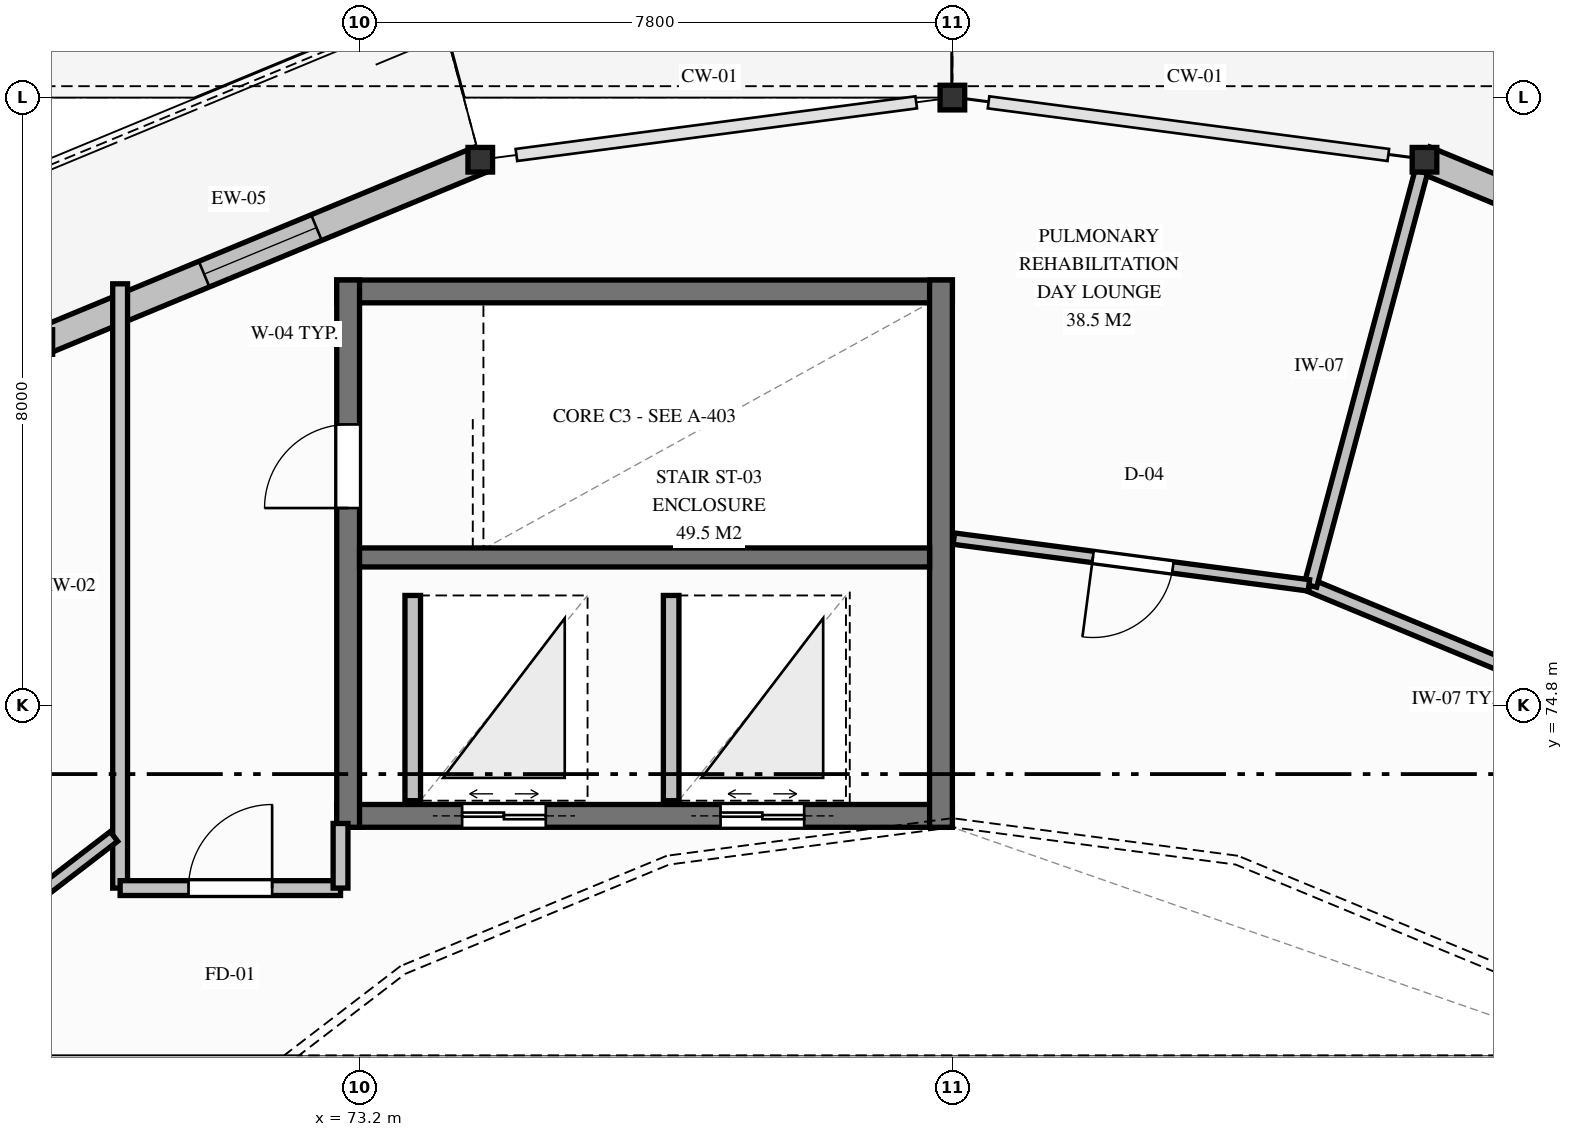
"""IFC4 building model, lengths in metres.
Left out: names, types, materials, properties, quantities, classifications, styles, units other than length and angle.
Written with IfcOpenShell. Run it as: python <this file> out.ifc"""

import sys

from ifc_helpers import new_model, si_unit, direction, frame, frame_2d, origin, origin_2d, place, context, subcontext, project, spatial, rectangle, hollow_circle, extrude, element, fill, save


model = new_model("IFC4")
c1 = context("Model", 3, precision=1e-05, world=origin(), true_north=direction((0.0, 1.0)))
c2 = subcontext(c1, "Body", "Model", "MODEL_VIEW")
j1 = project(units=[si_unit("LENGTHUNIT", "METRE"), si_unit("PLANEANGLEUNIT", "RADIAN")], contexts=[c1])
p1 = place(None, origin())
s1 = spatial("IfcSite", under=j1, at=p1, CompositionType="ELEMENT")
p2 = place(p1, origin())
s2 = spatial("IfcBuilding", under=s1, at=p2, CompositionType="ELEMENT")
p3 = place(p2, frame((0.0, 0.0, 17.25)))
s3 = spatial("IfcBuildingStorey", under=s2, at=p3, CompositionType="ELEMENT", Elevation=17.25)
p4 = place(p3, frame((72.9, 80.25, 0.0), z_axis=(0.0, 0.0, 1.0), x_axis=(1.0, 0.0, 0.0)))
e1 = element("IfcWall", 1, at=p4, inside=s3, PredefinedType="SHEAR", context=c2, shape_type="SweptSolid", body=[
    extrude(rectangle(XDim=8.1, YDim=0.3, at=frame_2d((4.05, 0.0))), origin(), (0.0, 0.0, 1.0), 4.05),
])
p5 = place(p3, frame((72.9, 73.35, 0.0), z_axis=(0.0, 0.0, 1.0), x_axis=(1.0, 0.0, 0.0)))
e2 = element("IfcWall", 2, at=p5, inside=s3, PredefinedType="SHEAR", context=c2, shape_type="SweptSolid", body=[
    extrude(rectangle(XDim=8.1, YDim=0.3, at=frame_2d((4.05, 0.0))), origin(), (0.0, 0.0, 1.0), 4.05),
])
p6 = place(p5, frame((1.65, 0.0, 0.0)))
e3 = element("IfcOpeningElement", 3, at=p6, cuts=e2, PredefinedType="OPENING", context=c2, shape_type="SweptSolid", body=[
    extrude(rectangle(XDim=1.1, YDim=2.1, at=frame_2d((0.55, 1.05))), frame((0.0, 0.16, 0.0), z_axis=(0.0, -1.0, 0.0), x_axis=(1.0, 0.0, 0.0)), (0.0, 0.0, 1.0), 0.32),
])
p7 = place(p5, frame((5.05, 0.0, 0.0)))
e4 = element("IfcOpeningElement", 4, at=p7, cuts=e2, PredefinedType="OPENING", context=c2, shape_type="SweptSolid", body=[
    extrude(rectangle(XDim=1.1, YDim=2.1, at=frame_2d((0.55, 1.05))), frame((0.0, 0.16, 0.0), z_axis=(0.0, -1.0, 0.0), x_axis=(1.0, 0.0, 0.0)), (0.0, 0.0, 1.0), 0.32),
])
p8 = place(p3, frame((73.05, 73.2, 0.0), z_axis=(0.0, 0.0, 1.0), x_axis=(0.0, 1.0, 0.0)))
e5 = element("IfcWall", 5, at=p8, inside=s3, PredefinedType="SHEAR", context=c2, shape_type="SweptSolid", body=[
    extrude(rectangle(XDim=7.2, YDim=0.3, at=frame_2d((3.6, 0.0))), origin(), (0.0, 0.0, 1.0), 4.05),
])
p9 = place(p8, frame((4.2, 0.0, 0.0)))
e6 = element("IfcOpeningElement", 6, at=p9, cuts=e5, PredefinedType="OPENING", context=c2, shape_type="SweptSolid", body=[
    extrude(rectangle(XDim=1.1, YDim=2.15, at=frame_2d((0.55, 1.075))), frame((0.0, 0.16, 0.0), z_axis=(0.0, -1.0, 0.0), x_axis=(1.0, 0.0, 0.0)), (0.0, 0.0, 1.0), 0.32),
])
p10 = place(p3, frame((80.85, 73.2, 0.0), z_axis=(0.0, 0.0, 1.0), x_axis=(0.0, 1.0, 0.0)))
e7 = element("IfcWall", 7, at=p10, inside=s3, PredefinedType="SHEAR", context=c2, shape_type="SweptSolid", body=[
    extrude(rectangle(XDim=7.2, YDim=0.3, at=frame_2d((3.6, 0.0))), origin(), (0.0, 0.0, 1.0), 4.05),
])
p11 = place(p3, frame((73.2, 76.75, 0.0), z_axis=(0.0, 0.0, 1.0), x_axis=(1.0, 0.0, 0.0)))
e8 = element("IfcWall", 8, at=p11, inside=s3, PredefinedType="SHEAR", context=c2, shape_type="SweptSolid", body=[
    extrude(rectangle(XDim=7.5, YDim=0.25, at=frame_2d((3.75, 0.0))), origin(), (0.0, 0.0, 1.0), 4.05),
])
for number, where, z_axis, x_axis in (
    (9, (87.212, 81.982, 0.0), (0.0, 0.0, 1.0), (1.0, 0.0, 0.0)),
    (10, (81.0, 82.8, 0.0), (0.0, 0.0, 1.0), (1.0, 0.0, 0.0)),
    (11, (74.788, 81.982, 0.0), (0.0, 0.0, 1.0), (1.0, 0.0, 0.0)),
    (12, (69.0, 79.585, 0.0), (0.0, 0.0, 1.0), (1.0, 0.0, 0.0)),
):
    element("IfcColumn", number, at=place(p3, frame(where, z_axis=z_axis, x_axis=x_axis)), inside=s3, PredefinedType="COLUMN", context=c2, shape_type="SweptSolid", body=[
        extrude(hollow_circle(Radius=0.162, WallThickness=0.016, at=origin_2d()), origin(), (0.0, 0.0, 1.0), 4.05),
    ])
p12 = place(p3, frame((87.212, 81.982, 0.0), z_axis=(0.0, 0.0, 1.0), x_axis=(0.9238876519, -0.382663829839, 0.0)))
e13 = element("IfcWall", 13, at=p12, inside=s3, PredefinedType="SOLIDWALL", context=c2, shape_type="SweptSolid", body=[
    extrude(rectangle(XDim=6.265, YDim=0.365, at=frame_2d((3.133, 0.0))), origin(), (0.0, 0.0, 1.0), 3.528),
])
p13 = place(p12, frame((2.258, 0.0, 0.85)))
e14 = element("IfcOpeningElement", 14, at=p13, cuts=e13, PredefinedType="OPENING", context=c2, shape_type="SweptSolid", body=[
    extrude(rectangle(XDim=1.75, YDim=1.85, at=frame_2d((0.875, 0.925))), frame((0.0, 0.192, 0.0), z_axis=(0.0, -1.0, 0.0), x_axis=(1.0, 0.0, 0.0)), (0.0, 0.0, 1.0), 0.385),
])
p14 = place(p3, frame((69.0, 79.585, 0.0), z_axis=(0.0, 0.0, 1.0), x_axis=(0.9238876519, 0.382663829839, 0.0)))
e15 = element("IfcWall", 15, at=p14, inside=s3, PredefinedType="SOLIDWALL", context=c2, shape_type="SweptSolid", body=[
    extrude(rectangle(XDim=6.265, YDim=0.365, at=frame_2d((3.133, 0.0))), origin(), (0.0, 0.0, 1.0), 3.528),
])
p15 = place(p14, frame((2.333, 0.0, 0.85)))
e16 = element("IfcOpeningElement", 16, at=p15, cuts=e15, PredefinedType="OPENING", context=c2, shape_type="SweptSolid", body=[
    extrude(rectangle(XDim=1.6, YDim=1.9, at=frame_2d((0.8, 0.95))), frame((0.0, 0.192, 0.0), z_axis=(0.0, -1.0, 0.0), x_axis=(1.0, 0.0, 0.0)), (0.0, 0.0, 1.0), 0.385),
])
for number, where, z_axis, x_axis in (
    (17, (73.9, 73.55, 0.0), (0.0, 0.0, 1.0), (0.0, 1.0, 0.0)),
    (18, (77.3, 73.55, 0.0), (0.0, 0.0, 1.0), (0.0, 1.0, 0.0)),
):
    element("IfcWall", number, at=place(p3, frame(where, z_axis=z_axis, x_axis=x_axis)), inside=s3, PredefinedType="PARTITIONING", context=c2, shape_type="SweptSolid", body=[
        extrude(rectangle(XDim=2.7, YDim=0.205, at=frame_2d((1.35, 0.0))), origin(), (0.0, 0.0, 1.0), 3.78),
    ])
p16 = place(p3, frame((70.05, 72.4, 0.0), z_axis=(0.0, 0.0, 1.0), x_axis=(0.0, 1.0, 0.0)))
e19 = element("IfcWall", 19, at=p16, inside=s3, PredefinedType="PARTITIONING", context=c2, shape_type="SweptSolid", body=[
    extrude(rectangle(XDim=7.95, YDim=0.195, at=frame_2d((3.975, 0.0))), origin(), (0.0, 0.0, 1.0), 3.528),
])
p17 = place(p3, frame((70.05, 72.4, 0.0), z_axis=(0.0, 0.0, 1.0), x_axis=(1.0, 0.0, 0.0)))
e20 = element("IfcWall", 20, at=p17, inside=s3, PredefinedType="PARTITIONING", context=c2, shape_type="SweptSolid", body=[
    extrude(rectangle(XDim=2.9, YDim=0.195, at=frame_2d((1.45, 0.0))), origin(), (0.0, 0.0, 1.0), 3.78),
])
p18 = place(p17, frame((0.9, 0.0, 0.0)))
e21 = element("IfcOpeningElement", 21, at=p18, cuts=e20, PredefinedType="OPENING", context=c2, shape_type="SweptSolid", body=[
    extrude(rectangle(XDim=1.1, YDim=2.15, at=frame_2d((0.55, 1.075))), frame((0.0, 0.107, 0.0), z_axis=(0.0, -1.0, 0.0), x_axis=(1.0, 0.0, 0.0)), (0.0, 0.0, 1.0), 0.215),
])
p19 = place(p3, frame((72.95, 72.4, 0.0), z_axis=(0.0, 0.0, 1.0), x_axis=(0.0, 1.0, 0.0)))
e22 = element("IfcWall", 22, at=p19, inside=s3, PredefinedType="PARTITIONING", context=c2, shape_type="SweptSolid", body=[
    extrude(rectangle(XDim=0.85, YDim=0.195, at=frame_2d((0.425, 0.0))), origin(), (0.0, 0.0, 1.0), 3.78),
])
p20 = place(p3, frame((90.1, 74.562, 0.0), z_axis=(0.0, 0.0, 1.0), x_axis=(-0.923889703059, 0.382658877568, 0.0)))
e23 = element("IfcWall", 23, at=p20, inside=s3, PredefinedType="PARTITIONING", context=c2, shape_type="SweptSolid", body=[
    extrude(rectangle(XDim=4.751, YDim=0.17, at=frame_2d((2.375, 0.0))), origin(), (0.0, 0.0, 1.0), 3.78),
])
p21 = place(p3, frame((85.71, 76.38, 0.0), z_axis=(0.0, 0.0, 1.0), x_axis=(0.258829913508, 0.965922914043, 0.0)))
e24 = element("IfcWall", 24, at=p21, inside=s3, PredefinedType="PARTITIONING", context=c2, shape_type="SweptSolid", body=[
    extrude(rectangle(XDim=5.636, YDim=0.17, at=frame_2d((2.818, 0.0))), origin(), (0.0, 0.0, 1.0), 3.528),
])
p22 = place(p3, frame((69.969, 73.079, 0.0), z_axis=(0.0, 0.0, 1.0), x_axis=(-0.7933756116, -0.608732403374, 0.0)))
e25 = element("IfcWall", 25, at=p22, inside=s3, PredefinedType="PARTITIONING", context=c2, shape_type="SweptSolid", body=[
    extrude(rectangle(XDim=2.317, YDim=0.16, at=frame_2d((1.158, 0.0))), origin(), (0.0, 0.0, 1.0), 3.78),
])
p23 = place(p3, frame((85.69, 76.383, 0.0), z_axis=(0.0, 0.0, 1.0), x_axis=(-0.991448296829, 0.13050009469, 0.0)))
e26 = element("IfcWall", 26, at=p23, inside=s3, PredefinedType="PARTITIONING", context=c2, shape_type="SweptSolid", body=[
    extrude(rectangle(XDim=4.711, YDim=0.15, at=frame_2d((2.355, 0.0))), origin(), (0.0, 0.0, 1.0), 3.78),
])
p24 = place(p23, frame((1.805, 0.0, 0.0)))
e27 = element("IfcOpeningElement", 27, at=p24, cuts=e26, PredefinedType="OPENING", context=c2, shape_type="SweptSolid", body=[
    extrude(rectangle(XDim=1.06, YDim=2.16, at=frame_2d((0.53, 1.08))), frame((0.0, 0.085, 0.0), z_axis=(0.0, -1.0, 0.0), x_axis=(1.0, 0.0, 0.0)), (0.0, 0.0, 1.0), 0.17),
])
p25 = place(p15, origin())
e28 = element("IfcWindow", 28, at=p25, inside=s3, PartitioningType="SINGLE_PANEL", PredefinedType="WINDOW", context=c2, shape_type="SweptSolid", body=[
    extrude(rectangle(XDim=1.6, YDim=1.9, at=frame_2d((0.8, 0.95))), frame((0.0, 0.03, 0.0), z_axis=(0.0, -1.0, 0.0), x_axis=(1.0, 0.0, 0.0)), (0.0, 0.0, 1.0), 0.06),
])
fill(e16, e28)
p26 = place(p9, origin())
e29 = element("IfcDoor", 29, at=p26, inside=s3, OperationType="SINGLE_SWING_LEFT", PredefinedType="DOOR", context=c2, shape_type="SweptSolid", body=[
    extrude(rectangle(XDim=1.1, YDim=2.15, at=frame_2d((0.55, 1.075))), frame((0.0, 0.025, 0.0), z_axis=(0.0, -1.0, 0.0), x_axis=(1.0, 0.0, 0.0)), (0.0, 0.0, 1.0), 0.05),
])
fill(e6, e29)
p27 = place(p6, origin())
e30 = element("IfcDoor", 30, at=p27, inside=s3, OperationType="DOUBLE_DOOR_SLIDING", PredefinedType="DOOR", context=c2, shape_type="SweptSolid", body=[
    extrude(rectangle(XDim=1.1, YDim=2.1, at=frame_2d((0.55, 1.05))), frame((0.0, 0.025, 0.0), z_axis=(0.0, -1.0, 0.0), x_axis=(1.0, 0.0, 0.0)), (0.0, 0.0, 1.0), 0.05),
])
fill(e3, e30)
p28 = place(p7, origin())
e31 = element("IfcDoor", 31, at=p28, inside=s3, OperationType="DOUBLE_DOOR_SLIDING", PredefinedType="DOOR", context=c2, shape_type="SweptSolid", body=[
    extrude(rectangle(XDim=1.1, YDim=2.1, at=frame_2d((0.55, 1.05))), frame((0.0, 0.025, 0.0), z_axis=(0.0, -1.0, 0.0), x_axis=(1.0, 0.0, 0.0)), (0.0, 0.0, 1.0), 0.05),
])
fill(e4, e31)
p29 = place(p18, origin())
e32 = element("IfcDoor", 32, at=p29, inside=s3, OperationType="SINGLE_SWING_RIGHT", PredefinedType="DOOR", context=c2, shape_type="SweptSolid", body=[
    extrude(rectangle(XDim=1.1, YDim=2.15, at=frame_2d((0.55, 1.075))), frame((0.0, 0.025, 0.0), z_axis=(0.0, -1.0, 0.0), x_axis=(1.0, 0.0, 0.0)), (0.0, 0.0, 1.0), 0.05),
])
fill(e21, e32)
p30 = place(p24, origin())
e33 = element("IfcDoor", 33, at=p30, inside=s3, OperationType="SINGLE_SWING_RIGHT", PredefinedType="DOOR", context=c2, shape_type="SweptSolid", body=[
    extrude(rectangle(XDim=1.06, YDim=2.16, at=frame_2d((0.53, 1.08))), frame((0.0, 0.025, 0.0), z_axis=(0.0, -1.0, 0.0), x_axis=(1.0, 0.0, 0.0)), (0.0, 0.0, 1.0), 0.05),
])
fill(e27, e33)
save(model, sys.argv[1])
